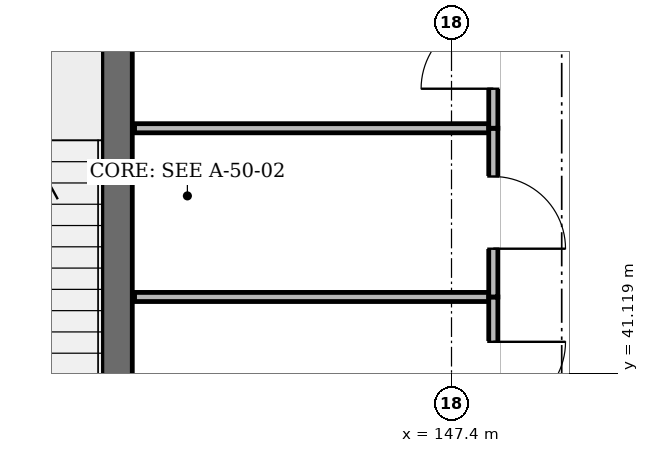
"""IFC4 building model, lengths in metres.
Left out: names, types, materials, properties, quantities, classifications, styles, units other than length and angle.
Written with IfcOpenShell. Run it as: python <this file> out.ifc"""

import sys

from ifc_helpers import new_model, si_unit, direction, frame, frame_2d, origin, place, context, subcontext, project, spatial, rectangle, extrude, element, fill, save


model = new_model("IFC4")
c1 = context("Model", 3, precision=1e-05, world=origin(), true_north=direction((0.0, 1.0)))
c2 = subcontext(c1, "Body", "Model", "MODEL_VIEW")
j1 = project(units=[si_unit("LENGTHUNIT", "METRE"), si_unit("PLANEANGLEUNIT", "RADIAN")], contexts=[c1])
p1 = place(None, origin())
s1 = spatial("IfcSite", under=j1, at=p1, CompositionType="ELEMENT")
p2 = place(p1, origin())
s2 = spatial("IfcBuilding", under=s1, at=p2, CompositionType="ELEMENT")
p3 = place(p2, frame((0.0, 0.0, 40.8)))
s3 = spatial("IfcBuildingStorey", under=s2, at=p3, CompositionType="ELEMENT", Elevation=40.8)
p4 = place(p3, frame((143.0, 39.7, 0.0), z_axis=(0.0, 0.0, 1.0), x_axis=(0.0, 1.0, 0.0)))
e1 = element("IfcWall", 1, at=p4, inside=s3, PredefinedType="SHEAR", context=c2, shape_type="SweptSolid", body=[
    extrude(rectangle(XDim=7.0, YDim=0.4, at=frame_2d((3.5, 0.0))), origin(), (0.0, 0.0, 1.0), 3.94),
])
p5 = place(p3, frame((143.23, 42.12, 0.0), z_axis=(0.0, 0.0, 1.0), x_axis=(1.0, 0.0, 0.0)))
e2 = element("IfcWall", 2, at=p5, inside=s3, PredefinedType="PARTITIONING", context=c2, shape_type="SweptSolid", body=[
    extrude(rectangle(XDim=4.72, YDim=0.12, at=frame_2d((2.36, 0.0))), origin(), (0.0, 0.0, 1.0), 3.415),
])
p6 = place(p3, frame((147.95, 42.12, 0.0), z_axis=(0.0, 0.0, 1.0), x_axis=(0.0, -1.0, 0.0)))
e3 = element("IfcWall", 3, at=p6, inside=s3, PredefinedType="PARTITIONING", context=c2, shape_type="SweptSolid", body=[
    extrude(rectangle(XDim=2.13, YDim=0.12, at=frame_2d((1.065, 0.0))), origin(), (0.0, 0.0, 1.0), 3.805),
])
p7 = place(p6, frame((0.59, 0.0, 0.0)))
e4 = element("IfcOpeningElement", 4, at=p7, cuts=e3, PredefinedType="OPENING", context=c2, shape_type="SweptSolid", body=[
    extrude(rectangle(XDim=0.95, YDim=2.15, at=frame_2d((0.475, 1.075))), frame((0.0, 0.072, 0.0), z_axis=(0.0, -1.0, 0.0), x_axis=(1.0, 0.0, 0.0)), (0.0, 0.0, 1.0), 0.144),
])
p8 = place(p3, frame((143.23, 44.34, 0.0), z_axis=(0.0, 0.0, 1.0), x_axis=(1.0, 0.0, 0.0)))
e5 = element("IfcWall", 5, at=p8, inside=s3, PredefinedType="PARTITIONING", context=c2, shape_type="SweptSolid", body=[
    extrude(rectangle(XDim=4.72, YDim=0.12, at=frame_2d((2.36, 0.0))), origin(), (0.0, 0.0, 1.0), 3.365),
])
p9 = place(p3, frame((147.95, 44.34, 0.0), z_axis=(0.0, 0.0, 1.0), x_axis=(0.0, -1.0, 0.0)))
e6 = element("IfcWall", 6, at=p9, inside=s3, PredefinedType="PARTITIONING", context=c2, shape_type="SweptSolid", body=[
    extrude(rectangle(XDim=2.22, YDim=0.12, at=frame_2d((1.11, 0.0))), origin(), (0.0, 0.0, 1.0), 3.805),
])
p10 = place(p9, frame((0.635, 0.0, 0.0)))
e7 = element("IfcOpeningElement", 7, at=p10, cuts=e6, PredefinedType="OPENING", context=c2, shape_type="SweptSolid", body=[
    extrude(rectangle(XDim=0.95, YDim=2.15, at=frame_2d((0.475, 1.075))), frame((0.0, 0.072, 0.0), z_axis=(0.0, -1.0, 0.0), x_axis=(1.0, 0.0, 0.0)), (0.0, 0.0, 1.0), 0.144),
])
p11 = place(p3, frame((147.95, 46.33, 0.0), z_axis=(0.0, 0.0, 1.0), x_axis=(0.0, -1.0, 0.0)))
e8 = element("IfcWall", 8, at=p11, inside=s3, PredefinedType="PARTITIONING", context=c2, shape_type="SweptSolid", body=[
    extrude(rectangle(XDim=1.99, YDim=0.12, at=frame_2d((0.995, 0.0))), origin(), (0.0, 0.0, 1.0), 3.805),
])
p12 = place(p11, frame((0.52, 0.0, 0.0)))
e9 = element("IfcOpeningElement", 9, at=p12, cuts=e8, PredefinedType="OPENING", context=c2, shape_type="SweptSolid", body=[
    extrude(rectangle(XDim=0.95, YDim=2.15, at=frame_2d((0.475, 1.075))), frame((0.0, 0.072, 0.0), z_axis=(0.0, -1.0, 0.0), x_axis=(1.0, 0.0, 0.0)), (0.0, 0.0, 1.0), 0.144),
])
p13 = place(p7, origin())
e10 = element("IfcDoor", 10, at=p13, inside=s3, OperationType="SINGLE_SWING_LEFT", PredefinedType="DOOR", context=c2, shape_type="SweptSolid", body=[
    extrude(rectangle(XDim=0.95, YDim=2.15, at=frame_2d((0.475, 1.075))), frame((0.0, 0.025, 0.0), z_axis=(0.0, -1.0, 0.0), x_axis=(1.0, 0.0, 0.0)), (0.0, 0.0, 1.0), 0.05),
])
fill(e4, e10)
p14 = place(p10, origin())
e11 = element("IfcDoor", 11, at=p14, inside=s3, OperationType="SINGLE_SWING_RIGHT", PredefinedType="DOOR", context=c2, shape_type="SweptSolid", body=[
    extrude(rectangle(XDim=0.95, YDim=2.15, at=frame_2d((0.475, 1.075))), frame((0.0, 0.025, 0.0), z_axis=(0.0, -1.0, 0.0), x_axis=(1.0, 0.0, 0.0)), (0.0, 0.0, 1.0), 0.05),
])
fill(e7, e11)
p15 = place(p12, frame((0.95, 0.0, 0.0), z_axis=(0.0, 0.0, 1.0), x_axis=(-1.0, 0.0, 0.0)))
e12 = element("IfcDoor", 12, at=p15, inside=s3, OperationType="SINGLE_SWING_LEFT", PredefinedType="DOOR", context=c2, shape_type="SweptSolid", body=[
    extrude(rectangle(XDim=0.95, YDim=2.15, at=frame_2d((0.475, 1.075))), frame((0.0, 0.025, 0.0), z_axis=(0.0, -1.0, 0.0), x_axis=(1.0, 0.0, 0.0)), (0.0, 0.0, 1.0), 0.05),
])
fill(e9, e12)
save(model, sys.argv[1])
